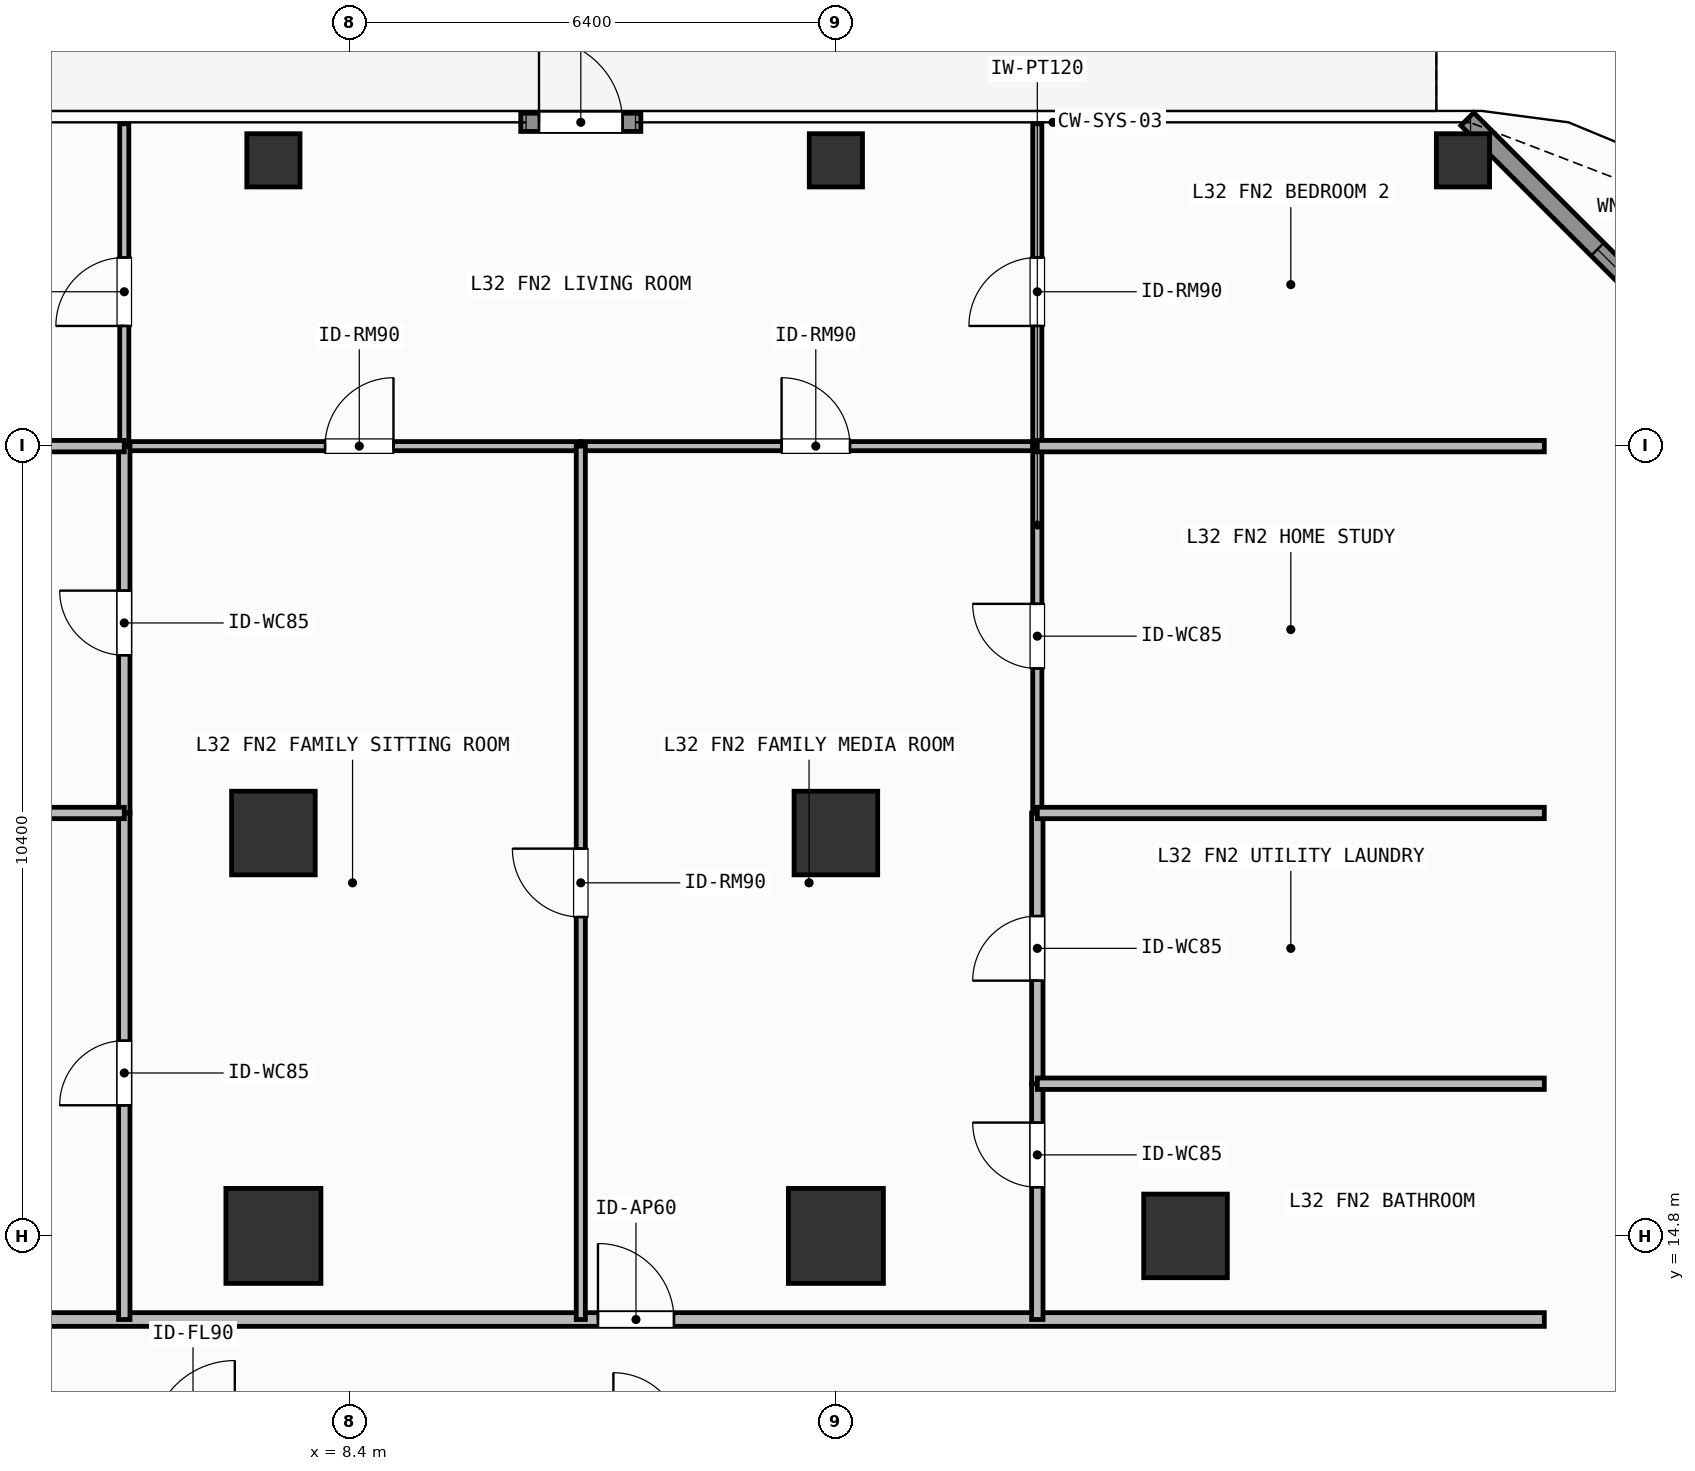
"""IFC4 building model, lengths in metres.
Left out: names, types, materials, properties, quantities, classifications, styles, units other than length and angle.
Written with IfcOpenShell. Run it as: python <this file> out.ifc"""

import sys

from ifc_helpers import new_model, si_unit, direction, frame, frame_2d, origin, origin_2d, place, context, subcontext, project, spatial, rectangle, hollow_rectangle, extrude, element, fill, save


model = new_model("IFC4")
c1 = context("Model", 3, precision=1e-05, world=origin(), true_north=direction((0.0, 1.0)))
c2 = subcontext(c1, "Body", "Model", "MODEL_VIEW")
j1 = project(units=[si_unit("LENGTHUNIT", "METRE"), si_unit("PLANEANGLEUNIT", "RADIAN")], contexts=[c1])
p1 = place(None, origin())
s1 = spatial("IfcSite", under=j1, at=p1, CompositionType="ELEMENT")
p2 = place(p1, origin())
s2 = spatial("IfcBuilding", under=s1, at=p2, CompositionType="ELEMENT")
p3 = place(p2, frame((0.0, 0.0, 129.0)))
s3 = spatial("IfcBuildingStorey", under=s2, at=p3, CompositionType="ELEMENT", Elevation=129.0)
for number, where, z_axis, x_axis in (
    (1, (7.4, 14.8, 0.0), (0.0, 0.0, 1.0), (1.0, 0.0, 0.0)),
    (2, (14.8, 14.8, 0.0), (0.0, 0.0, 1.0), (1.0, 0.0, 0.0)),
):
    element("IfcColumn", number, at=place(p3, frame(where, z_axis=z_axis, x_axis=x_axis)), inside=s3, PredefinedType="COLUMN", context=c2, shape_type="SweptSolid", body=[
        extrude(rectangle(XDim=1.25, YDim=1.25, at=origin_2d()), origin(), (0.0, 0.0, 1.0), 3.9),
    ])
for number, where, z_axis, x_axis in (
    (3, (19.4, 14.8, 0.0), (0.0, 0.0, 1.0), (1.0, 0.0, 0.0)),
    (4, (7.4, 20.1, 0.0), (0.0, 0.0, 1.0), (1.0, 0.0, 0.0)),
    (5, (14.8, 20.1, 0.0), (0.0, 0.0, 1.0), (1.0, 0.0, 0.0)),
):
    element("IfcColumn", number, at=place(p3, frame(where, z_axis=z_axis, x_axis=x_axis)), inside=s3, PredefinedType="COLUMN", context=c2, shape_type="SweptSolid", body=[
        extrude(rectangle(XDim=1.1, YDim=1.1, at=origin_2d()), origin(), (0.0, 0.0, 1.0), 3.9),
    ])
for number, where, z_axis, x_axis in (
    (6, (23.05, 28.95, 0.0), (0.0, 0.0, 1.0), (1.0, 0.0, 0.0)),
    (7, (7.4, 28.95, 0.0), (0.0, 0.0, 1.0), (1.0, 0.0, 0.0)),
    (8, (14.8, 28.95, 0.0), (0.0, 0.0, 1.0), (1.0, 0.0, 0.0)),
):
    element("IfcColumn", number, at=place(p3, frame(where, z_axis=z_axis, x_axis=x_axis)), inside=s3, PredefinedType="COLUMN", context=c2, shape_type="SweptSolid", body=[
        extrude(hollow_rectangle(XDim=0.7, YDim=0.7, WallThickness=0.032, at=origin_2d()), origin(), (0.0, 0.0, 1.0), 3.9),
    ])
p4 = place(p3, frame((10.654, 29.45, 0.0), z_axis=(0.0, 0.0, 1.0), x_axis=(1.0, 0.0, 0.0)))
e9 = element("IfcWall", 9, at=p4, inside=s3, PredefinedType="SOLIDWALL", context=c2, shape_type="SweptSolid", body=[
    extrude(rectangle(XDim=1.58, YDim=0.24, at=frame_2d((0.79, 0.0))), origin(), (0.0, 0.0, 1.0), 3.68),
])
p5 = place(p4, frame((0.24, 0.0, 0.0)))
e10 = element("IfcOpeningElement", 10, at=p5, cuts=e9, PredefinedType="OPENING", context=c2, shape_type="SweptSolid", body=[
    extrude(rectangle(XDim=1.1, YDim=2.2, at=frame_2d((0.55, 1.1))), frame((0.0, 0.13, 0.0), z_axis=(0.0, -1.0, 0.0), x_axis=(1.0, 0.0, 0.0)), (0.0, 0.0, 1.0), 0.26),
])
p6 = place(p3, frame((23.108, 29.492, 0.0), z_axis=(0.0, 0.0, 1.0), x_axis=(0.707087534163, -0.707126027686, 0.0)))
e11 = element("IfcWall", 11, at=p6, inside=s3, PredefinedType="SOLIDWALL", context=c2, shape_type="SweptSolid", body=[
    extrude(rectangle(XDim=6.342, YDim=0.24, at=frame_2d((3.171, 0.0))), origin(), (0.0, 0.0, 1.0), 3.68),
])
p7 = place(p6, frame((2.421, 0.0, 0.8)))
e12 = element("IfcOpeningElement", 12, at=p7, cuts=e11, PredefinedType="OPENING", context=c2, shape_type="SweptSolid", body=[
    extrude(rectangle(XDim=1.5, YDim=1.85, at=frame_2d((0.75, 0.925))), frame((0.0, 0.13, 0.0), z_axis=(0.0, -1.0, 0.0), x_axis=(1.0, 0.0, 0.0)), (0.0, 0.0, 1.0), 0.26),
])
p8 = place(p3, frame((1.474, 13.7, 0.0), z_axis=(0.0, 0.0, 1.0), x_axis=(1.0, 0.0, 0.0)))
e13 = element("IfcWall", 13, at=p8, inside=s3, PredefinedType="PARTITIONING", context=c2, shape_type="SweptSolid", body=[
    extrude(rectangle(XDim=22.646, YDim=0.18, at=frame_2d((11.323, 0.0))), origin(), (0.0, 0.0, 1.0), 3.68),
])
p9 = place(p8, frame((10.196, 0.0, 0.0)))
e14 = element("IfcOpeningElement", 14, at=p9, cuts=e13, PredefinedType="OPENING", context=c2, shape_type="SweptSolid", body=[
    extrude(rectangle(XDim=1.0, YDim=2.2, at=frame_2d((0.5, 1.1))), frame((0.0, 0.1, 0.0), z_axis=(0.0, -1.0, 0.0), x_axis=(1.0, 0.0, 0.0)), (0.0, 0.0, 1.0), 0.2),
])
p10 = place(p3, frame((5.438, 25.19, 0.0), z_axis=(0.0, 0.0, 1.0), x_axis=(1.0, 0.0, 0.0)))
e15 = element("IfcWall", 15, at=p10, inside=s3, PredefinedType="PARTITIONING", context=c2, shape_type="SweptSolid", body=[
    extrude(rectangle(XDim=6.006, YDim=0.12, at=frame_2d((3.003, 0.0))), origin(), (0.0, 0.0, 1.0), 3.68),
])
p11 = place(p10, frame((2.642, 0.0, 0.0)))
e16 = element("IfcOpeningElement", 16, at=p11, cuts=e15, PredefinedType="OPENING", context=c2, shape_type="SweptSolid", body=[
    extrude(rectangle(XDim=0.9, YDim=2.1, at=frame_2d((0.45, 1.05))), frame((0.0, 0.07, 0.0), z_axis=(0.0, -1.0, 0.0), x_axis=(1.0, 0.0, 0.0)), (0.0, 0.0, 1.0), 0.14),
])
p12 = place(p3, frame((11.444, 25.19, 0.0), z_axis=(0.0, 0.0, 1.0), x_axis=(1.0, 0.0, 0.0)))
e17 = element("IfcWall", 17, at=p12, inside=s3, PredefinedType="PARTITIONING", context=c2, shape_type="SweptSolid", body=[
    extrude(rectangle(XDim=6.006, YDim=0.12, at=frame_2d((3.003, 0.0))), origin(), (0.0, 0.0, 1.0), 3.68),
])
p13 = place(p12, frame((2.642, 0.0, 0.0)))
e18 = element("IfcOpeningElement", 18, at=p13, cuts=e17, PredefinedType="OPENING", context=c2, shape_type="SweptSolid", body=[
    extrude(rectangle(XDim=0.9, YDim=2.1, at=frame_2d((0.45, 1.05))), frame((0.0, 0.07, 0.0), z_axis=(0.0, -1.0, 0.0), x_axis=(1.0, 0.0, 0.0)), (0.0, 0.0, 1.0), 0.14),
])
p14 = place(p3, frame((11.444, 13.7, 0.0), z_axis=(0.0, 0.0, 1.0), x_axis=(0.0, 1.0, 0.0)))
e19 = element("IfcWall", 19, at=p14, inside=s3, PredefinedType="PARTITIONING", context=c2, shape_type="SweptSolid", body=[
    extrude(rectangle(XDim=11.49, YDim=0.12, at=frame_2d((5.745, 0.0))), origin(), (0.0, 0.0, 1.0), 3.68),
])
p15 = place(p14, frame((5.295, 0.0, 0.0)))
e20 = element("IfcOpeningElement", 20, at=p15, cuts=e19, PredefinedType="OPENING", context=c2, shape_type="SweptSolid", body=[
    extrude(rectangle(XDim=0.9, YDim=2.1, at=frame_2d((0.45, 1.05))), frame((0.0, 0.07, 0.0), z_axis=(0.0, -1.0, 0.0), x_axis=(1.0, 0.0, 0.0)), (0.0, 0.0, 1.0), 0.14),
])
p16 = place(p3, frame((5.438, 13.7, 0.0), z_axis=(0.0, 0.0, 1.0), x_axis=(0.0, 1.0, 0.0)))
e21 = element("IfcWall", 21, at=p16, inside=s3, PredefinedType="PARTITIONING", context=c2, shape_type="SweptSolid", body=[
    extrude(rectangle(XDim=6.664, YDim=0.15, at=frame_2d((3.332, 0.0))), origin(), (0.0, 0.0, 1.0), 3.68),
])
p17 = place(p16, frame((2.818, 0.0, 0.0)))
e22 = element("IfcOpeningElement", 22, at=p17, cuts=e21, PredefinedType="OPENING", context=c2, shape_type="SweptSolid", body=[
    extrude(rectangle(XDim=0.85, YDim=2.1, at=frame_2d((0.425, 1.05))), frame((0.0, 0.085, 0.0), z_axis=(0.0, -1.0, 0.0), x_axis=(1.0, 0.0, 0.0)), (0.0, 0.0, 1.0), 0.17),
])
p18 = place(p3, frame((5.438, 20.364, 0.0), z_axis=(0.0, 0.0, 1.0), x_axis=(0.0, 1.0, 0.0)))
e23 = element("IfcWall", 23, at=p18, inside=s3, PredefinedType="PARTITIONING", context=c2, shape_type="SweptSolid", body=[
    extrude(rectangle(XDim=4.826, YDim=0.15, at=frame_2d((2.413, 0.0))), origin(), (0.0, 0.0, 1.0), 3.68),
])
p19 = place(p18, frame((2.075, 0.0, 0.0)))
e24 = element("IfcOpeningElement", 24, at=p19, cuts=e23, PredefinedType="OPENING", context=c2, shape_type="SweptSolid", body=[
    extrude(rectangle(XDim=0.85, YDim=2.1, at=frame_2d((0.425, 1.05))), frame((0.0, 0.085, 0.0), z_axis=(0.0, -1.0, 0.0), x_axis=(1.0, 0.0, 0.0)), (0.0, 0.0, 1.0), 0.17),
])
p20 = place(p3, frame((5.438, 25.19, 0.0), z_axis=(0.0, 0.0, 1.0), x_axis=(0.0, 1.0, 0.0)))
e25 = element("IfcWall", 25, at=p20, inside=s3, PredefinedType="PARTITIONING", context=c2, shape_type="SweptSolid", body=[
    extrude(rectangle(XDim=4.24, YDim=0.12, at=frame_2d((2.12, 0.0))), origin(), (0.0, 0.0, 1.0), 3.68),
])
p21 = place(p20, frame((1.581, 0.0, 0.0)))
e26 = element("IfcOpeningElement", 26, at=p21, cuts=e25, PredefinedType="OPENING", context=c2, shape_type="SweptSolid", body=[
    extrude(rectangle(XDim=0.9, YDim=2.1, at=frame_2d((0.45, 1.05))), frame((0.0, 0.07, 0.0), z_axis=(0.0, -1.0, 0.0), x_axis=(1.0, 0.0, 0.0)), (0.0, 0.0, 1.0), 0.14),
])
p22 = place(p3, frame((17.45, 13.7, 0.0), z_axis=(0.0, 0.0, 1.0), x_axis=(0.0, 1.0, 0.0)))
e27 = element("IfcWall", 27, at=p22, inside=s3, PredefinedType="PARTITIONING", context=c2, shape_type="SweptSolid", body=[
    extrude(rectangle(XDim=3.102, YDim=0.15, at=frame_2d((1.551, 0.0))), origin(), (0.0, 0.0, 1.0), 3.68),
])
p23 = place(p22, frame((1.741, 0.0, 0.0)))
e28 = element("IfcOpeningElement", 28, at=p23, cuts=e27, PredefinedType="OPENING", context=c2, shape_type="SweptSolid", body=[
    extrude(rectangle(XDim=0.85, YDim=2.1, at=frame_2d((0.425, 1.05))), frame((0.0, 0.085, 0.0), z_axis=(0.0, -1.0, 0.0), x_axis=(1.0, 0.0, 0.0)), (0.0, 0.0, 1.0), 0.17),
])
p24 = place(p3, frame((17.45, 16.802, 0.0), z_axis=(0.0, 0.0, 1.0), x_axis=(0.0, 1.0, 0.0)))
e29 = element("IfcWall", 29, at=p24, inside=s3, PredefinedType="PARTITIONING", context=c2, shape_type="SweptSolid", body=[
    extrude(rectangle(XDim=3.562, YDim=0.15, at=frame_2d((1.781, 0.0))), origin(), (0.0, 0.0, 1.0), 3.68),
])
p25 = place(p24, frame((1.356, 0.0, 0.0)))
e30 = element("IfcOpeningElement", 30, at=p25, cuts=e29, PredefinedType="OPENING", context=c2, shape_type="SweptSolid", body=[
    extrude(rectangle(XDim=0.85, YDim=2.1, at=frame_2d((0.425, 1.05))), frame((0.0, 0.085, 0.0), z_axis=(0.0, -1.0, 0.0), x_axis=(1.0, 0.0, 0.0)), (0.0, 0.0, 1.0), 0.17),
])
p26 = place(p3, frame((17.45, 20.364, 0.0), z_axis=(0.0, 0.0, 1.0), x_axis=(0.0, 1.0, 0.0)))
e31 = element("IfcWall", 31, at=p26, inside=s3, PredefinedType="PARTITIONING", context=c2, shape_type="SweptSolid", body=[
    extrude(rectangle(XDim=4.826, YDim=0.12, at=frame_2d((2.413, 0.0))), origin(), (0.0, 0.0, 1.0), 3.68),
])
p27 = place(p26, frame((1.901, 0.0, 0.0)))
e32 = element("IfcOpeningElement", 32, at=p27, cuts=e31, PredefinedType="OPENING", context=c2, shape_type="SweptSolid", body=[
    extrude(rectangle(XDim=0.85, YDim=2.1, at=frame_2d((0.425, 1.05))), frame((0.0, 0.07, 0.0), z_axis=(0.0, -1.0, 0.0), x_axis=(1.0, 0.0, 0.0)), (0.0, 0.0, 1.0), 0.14),
])
p28 = place(p3, frame((17.45, 25.19, 0.0), z_axis=(0.0, 0.0, 1.0), x_axis=(0.0, 1.0, 0.0)))
e33 = element("IfcWall", 33, at=p28, inside=s3, PredefinedType="PARTITIONING", context=c2, shape_type="SweptSolid", body=[
    extrude(rectangle(XDim=4.24, YDim=0.12, at=frame_2d((2.12, 0.0))), origin(), (0.0, 0.0, 1.0), 3.68),
])
p29 = place(p28, frame((1.581, 0.0, 0.0)))
e34 = element("IfcOpeningElement", 34, at=p29, cuts=e33, PredefinedType="OPENING", context=c2, shape_type="SweptSolid", body=[
    extrude(rectangle(XDim=0.9, YDim=2.1, at=frame_2d((0.45, 1.05))), frame((0.0, 0.07, 0.0), z_axis=(0.0, -1.0, 0.0), x_axis=(1.0, 0.0, 0.0)), (0.0, 0.0, 1.0), 0.14),
])
p30 = place(p3, frame((1.474, 20.364, 0.0), z_axis=(0.0, 0.0, 1.0), x_axis=(1.0, 0.0, 0.0)))
e35 = element("IfcWall", 35, at=p30, inside=s3, PredefinedType="PARTITIONING", context=c2, shape_type="SweptSolid", body=[
    extrude(rectangle(XDim=3.964, YDim=0.15, at=frame_2d((1.982, 0.0))), origin(), (0.0, 0.0, 1.0), 3.082),
])
p31 = place(p3, frame((1.474, 25.19, 0.0), z_axis=(0.0, 0.0, 1.0), x_axis=(1.0, 0.0, 0.0)))
e36 = element("IfcWall", 36, at=p31, inside=s3, PredefinedType="PARTITIONING", context=c2, shape_type="SweptSolid", body=[
    extrude(rectangle(XDim=3.964, YDim=0.15, at=frame_2d((1.982, 0.0))), origin(), (0.0, 0.0, 1.0), 3.68),
])
for number, where, z_axis, x_axis in (
    (37, (17.45, 16.802, 0.0), (0.0, 0.0, 1.0), (1.0, 0.0, 0.0)),
    (38, (17.45, 20.364, 0.0), (0.0, 0.0, 1.0), (1.0, 0.0, 0.0)),
    (39, (17.45, 25.19, 0.0), (0.0, 0.0, 1.0), (1.0, 0.0, 0.0)),
):
    element("IfcWall", number, at=place(p3, frame(where, z_axis=z_axis, x_axis=x_axis)), inside=s3, PredefinedType="PARTITIONING", context=c2, shape_type="SweptSolid", body=[
        extrude(rectangle(XDim=6.67, YDim=0.15, at=frame_2d((3.335, 0.0))), origin(), (0.0, 0.0, 1.0), 3.68),
    ])
p32 = place(p5, origin())
e40 = element("IfcDoor", 40, at=p32, inside=s3, OperationType="SINGLE_SWING_LEFT", PredefinedType="DOOR", context=c2, shape_type="SweptSolid", body=[
    extrude(rectangle(XDim=1.1, YDim=2.2, at=frame_2d((0.55, 1.1))), frame((0.0, 0.025, 0.0), z_axis=(0.0, -1.0, 0.0), x_axis=(1.0, 0.0, 0.0)), (0.0, 0.0, 1.0), 0.05),
])
fill(e10, e40)
p33 = place(p7, origin())
e41 = element("IfcWindow", 41, at=p33, inside=s3, PartitioningType="SINGLE_PANEL", PredefinedType="WINDOW", context=c2, shape_type="SweptSolid", body=[
    extrude(rectangle(XDim=1.5, YDim=1.85, at=frame_2d((0.75, 0.925))), frame((0.0, 0.03, 0.0), z_axis=(0.0, -1.0, 0.0), x_axis=(1.0, 0.0, 0.0)), (0.0, 0.0, 1.0), 0.06),
])
fill(e12, e41)
p34 = place(p9, origin())
e42 = element("IfcDoor", 42, at=p34, inside=s3, OperationType="SINGLE_SWING_LEFT", PredefinedType="DOOR", context=c2, shape_type="SweptSolid", body=[
    extrude(rectangle(XDim=1.0, YDim=2.2, at=frame_2d((0.5, 1.1))), frame((0.0, 0.025, 0.0), z_axis=(0.0, -1.0, 0.0), x_axis=(1.0, 0.0, 0.0)), (0.0, 0.0, 1.0), 0.05),
])
fill(e14, e42)
p35 = place(p11, origin())
e43 = element("IfcDoor", 43, at=p35, inside=s3, OperationType="SINGLE_SWING_RIGHT", PredefinedType="DOOR", context=c2, shape_type="SweptSolid", body=[
    extrude(rectangle(XDim=0.9, YDim=2.1, at=frame_2d((0.45, 1.05))), frame((0.0, 0.025, 0.0), z_axis=(0.0, -1.0, 0.0), x_axis=(1.0, 0.0, 0.0)), (0.0, 0.0, 1.0), 0.05),
])
fill(e16, e43)
p36 = place(p13, origin())
e44 = element("IfcDoor", 44, at=p36, inside=s3, OperationType="SINGLE_SWING_LEFT", PredefinedType="DOOR", context=c2, shape_type="SweptSolid", body=[
    extrude(rectangle(XDim=0.9, YDim=2.1, at=frame_2d((0.45, 1.05))), frame((0.0, 0.025, 0.0), z_axis=(0.0, -1.0, 0.0), x_axis=(1.0, 0.0, 0.0)), (0.0, 0.0, 1.0), 0.05),
])
fill(e18, e44)
p37 = place(p15, origin())
e45 = element("IfcDoor", 45, at=p37, inside=s3, OperationType="SINGLE_SWING_RIGHT", PredefinedType="DOOR", context=c2, shape_type="SweptSolid", body=[
    extrude(rectangle(XDim=0.9, YDim=2.1, at=frame_2d((0.45, 1.05))), frame((0.0, 0.025, 0.0), z_axis=(0.0, -1.0, 0.0), x_axis=(1.0, 0.0, 0.0)), (0.0, 0.0, 1.0), 0.05),
])
fill(e20, e45)
p38 = place(p17, origin())
e46 = element("IfcDoor", 46, at=p38, inside=s3, OperationType="SINGLE_SWING_LEFT", PredefinedType="DOOR", context=c2, shape_type="SweptSolid", body=[
    extrude(rectangle(XDim=0.85, YDim=2.1, at=frame_2d((0.425, 1.05))), frame((0.0, 0.025, 0.0), z_axis=(0.0, -1.0, 0.0), x_axis=(1.0, 0.0, 0.0)), (0.0, 0.0, 1.0), 0.05),
])
fill(e22, e46)
p39 = place(p19, origin())
e47 = element("IfcDoor", 47, at=p39, inside=s3, OperationType="SINGLE_SWING_RIGHT", PredefinedType="DOOR", context=c2, shape_type="SweptSolid", body=[
    extrude(rectangle(XDim=0.85, YDim=2.1, at=frame_2d((0.425, 1.05))), frame((0.0, 0.025, 0.0), z_axis=(0.0, -1.0, 0.0), x_axis=(1.0, 0.0, 0.0)), (0.0, 0.0, 1.0), 0.05),
])
fill(e24, e47)
p40 = place(p21, origin())
e48 = element("IfcDoor", 48, at=p40, inside=s3, OperationType="SINGLE_SWING_LEFT", PredefinedType="DOOR", context=c2, shape_type="SweptSolid", body=[
    extrude(rectangle(XDim=0.9, YDim=2.1, at=frame_2d((0.45, 1.05))), frame((0.0, 0.025, 0.0), z_axis=(0.0, -1.0, 0.0), x_axis=(1.0, 0.0, 0.0)), (0.0, 0.0, 1.0), 0.05),
])
fill(e26, e48)
p41 = place(p23, origin())
e49 = element("IfcDoor", 49, at=p41, inside=s3, OperationType="SINGLE_SWING_RIGHT", PredefinedType="DOOR", context=c2, shape_type="SweptSolid", body=[
    extrude(rectangle(XDim=0.85, YDim=2.1, at=frame_2d((0.425, 1.05))), frame((0.0, 0.025, 0.0), z_axis=(0.0, -1.0, 0.0), x_axis=(1.0, 0.0, 0.0)), (0.0, 0.0, 1.0), 0.05),
])
fill(e28, e49)
p42 = place(p25, origin())
e50 = element("IfcDoor", 50, at=p42, inside=s3, OperationType="SINGLE_SWING_LEFT", PredefinedType="DOOR", context=c2, shape_type="SweptSolid", body=[
    extrude(rectangle(XDim=0.85, YDim=2.1, at=frame_2d((0.425, 1.05))), frame((0.0, 0.025, 0.0), z_axis=(0.0, -1.0, 0.0), x_axis=(1.0, 0.0, 0.0)), (0.0, 0.0, 1.0), 0.05),
])
fill(e30, e50)
p43 = place(p27, origin())
e51 = element("IfcDoor", 51, at=p43, inside=s3, OperationType="SINGLE_SWING_RIGHT", PredefinedType="DOOR", context=c2, shape_type="SweptSolid", body=[
    extrude(rectangle(XDim=0.85, YDim=2.1, at=frame_2d((0.425, 1.05))), frame((0.0, 0.025, 0.0), z_axis=(0.0, -1.0, 0.0), x_axis=(1.0, 0.0, 0.0)), (0.0, 0.0, 1.0), 0.05),
])
fill(e32, e51)
p44 = place(p29, origin())
e52 = element("IfcDoor", 52, at=p44, inside=s3, OperationType="SINGLE_SWING_LEFT", PredefinedType="DOOR", context=c2, shape_type="SweptSolid", body=[
    extrude(rectangle(XDim=0.9, YDim=2.1, at=frame_2d((0.45, 1.05))), frame((0.0, 0.025, 0.0), z_axis=(0.0, -1.0, 0.0), x_axis=(1.0, 0.0, 0.0)), (0.0, 0.0, 1.0), 0.05),
])
fill(e34, e52)
save(model, sys.argv[1])
